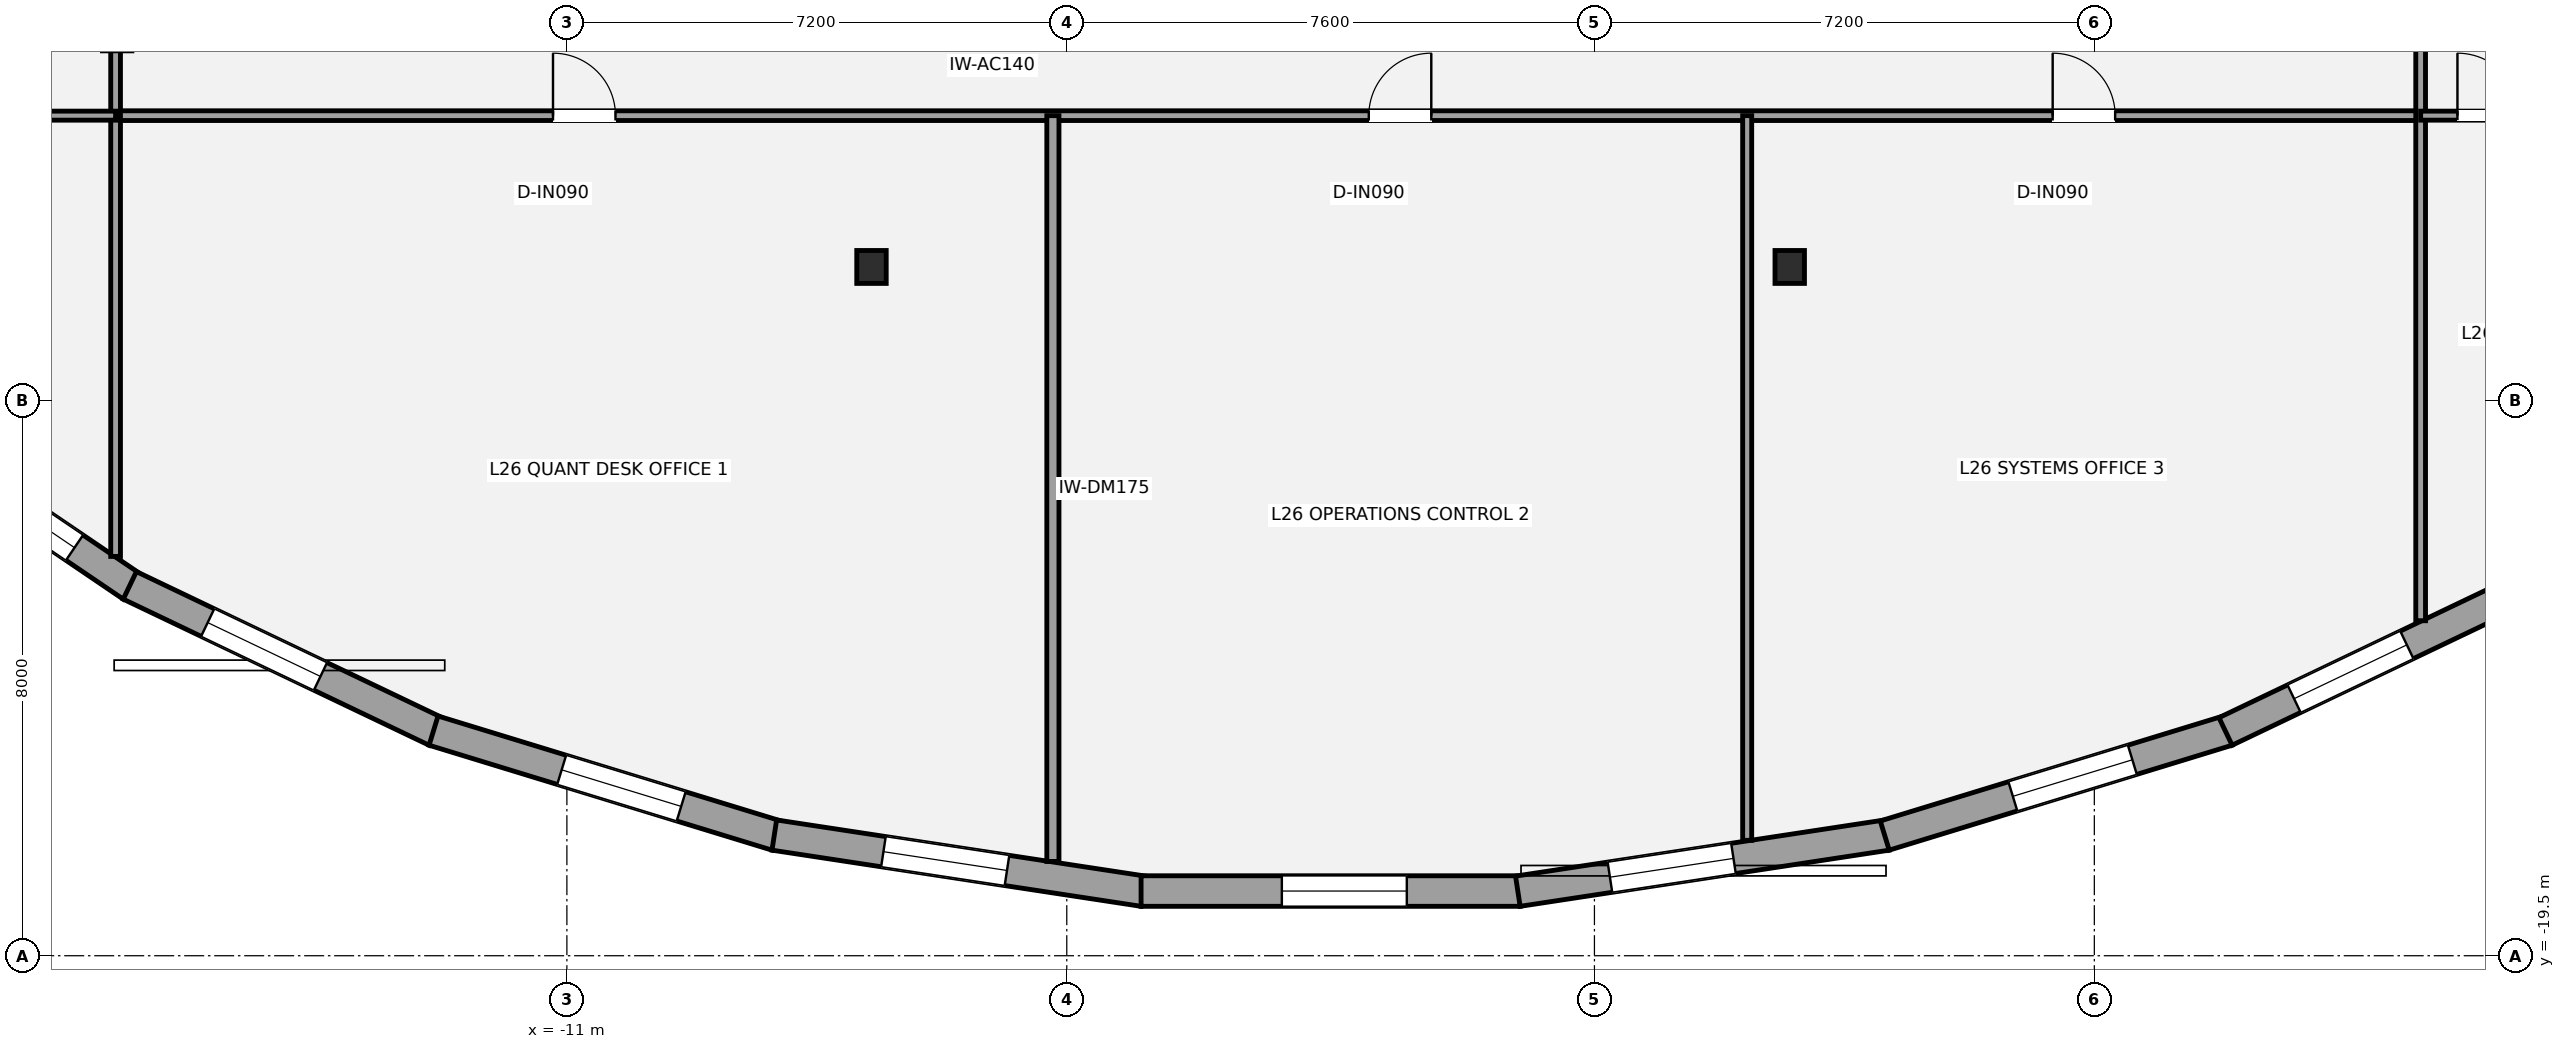
"""IFC4 building model, lengths in metres.
Left out: names, types, materials, properties, quantities, classifications, styles, units other than length and angle.
Written with IfcOpenShell. Run it as: python <this file> out.ifc"""

import sys

from ifc_helpers import new_model, si_unit, direction, frame, frame_2d, origin, origin_2d, place, context, subcontext, project, spatial, rectangle, i_section, extrude, element, fill, save


model = new_model("IFC4")
c1 = context("Model", 3, precision=1e-05, world=origin(), true_north=direction((0.0, 1.0)))
c2 = subcontext(c1, "Body", "Model", "MODEL_VIEW")
j1 = project(units=[si_unit("LENGTHUNIT", "METRE"), si_unit("PLANEANGLEUNIT", "RADIAN")], contexts=[c1])
p1 = place(None, origin())
s1 = spatial("IfcSite", under=j1, at=p1, CompositionType="ELEMENT")
p2 = place(p1, origin())
s2 = spatial("IfcBuilding", under=s1, at=p2, CompositionType="ELEMENT")
p3 = place(p2, frame((0.0, 0.0, 100.1)))
s3 = spatial("IfcBuildingStorey", under=s2, at=p3, CompositionType="ELEMENT", Elevation=100.1)
for number, where, z_axis, x_axis in (
    (1, (-6.613, -9.579, 0.0), (0.0, 0.0, 1.0), (1.0, 0.0, 0.0)),
    (2, (6.613, -9.579, 0.0), (0.0, 0.0, 1.0), (1.0, 0.0, 0.0)),
):
    element("IfcColumn", number, at=place(p3, frame(where, z_axis=z_axis, x_axis=x_axis)), inside=s3, PredefinedType="COLUMN", context=c2, shape_type="SweptSolid", body=[
        extrude(i_section(OverallWidth=0.424, OverallDepth=0.474, WebThickness=0.048, FlangeThickness=0.077, at=origin_2d()), origin(), (0.0, 0.0, 1.0), 3.5),
    ])
p4 = place(p3, frame((-17.266, -14.182, 0.0), z_axis=(0.0, 0.0, 1.0), x_axis=(-0.827754551165, 0.56109036975, 0.0)))
e3 = element("IfcWall", 3, at=p4, inside=s3, PredefinedType="STANDARD", context=c2, shape_type="SweptSolid", body=[
    extrude(rectangle(XDim=4.591, YDim=0.44, at=frame_2d((2.295, 0.0))), origin(), (0.0, 0.0, 1.0), 2.528),
])
p5 = place(p4, frame((0.997, 0.0, 0.65)))
e4 = element("IfcOpeningElement", 4, at=p5, cuts=e3, PredefinedType="OPENING", context=c2, shape_type="SweptSolid", body=[
    extrude(rectangle(XDim=1.8, YDim=1.7, at=frame_2d((0.9, 0.85))), frame((0.0, 0.23, 0.0), z_axis=(0.0, -1.0, 0.0), x_axis=(1.0, 0.0, 0.0)), (0.0, 0.0, 1.0), 0.46),
])
p6 = place(p3, frame((-12.89, -16.27, 0.0), z_axis=(0.0, 0.0, 1.0), x_axis=(-0.902372757907, 0.430956385018, 0.0)))
e5 = element("IfcWall", 5, at=p6, inside=s3, PredefinedType="STANDARD", context=c2, shape_type="SweptSolid", body=[
    extrude(rectangle(XDim=4.882, YDim=0.44, at=frame_2d((2.441, 0.0))), origin(), (0.0, 0.0, 1.0), 2.528),
])
p7 = place(p6, frame((1.839, 0.0, 0.65)))
e6 = element("IfcOpeningElement", 6, at=p7, cuts=e5, PredefinedType="OPENING", context=c2, shape_type="SweptSolid", body=[
    extrude(rectangle(XDim=1.8, YDim=1.7, at=frame_2d((0.9, 0.85))), frame((0.0, 0.23, 0.0), z_axis=(0.0, -1.0, 0.0), x_axis=(1.0, 0.0, 0.0)), (0.0, 0.0, 1.0), 0.46),
])
p8 = place(p3, frame((-7.981, -17.769, 0.0), z_axis=(0.0, 0.0, 1.0), x_axis=(-0.956228569431, 0.292620783617, 0.0)))
e7 = element("IfcWall", 7, at=p8, inside=s3, PredefinedType="STANDARD", context=c2, shape_type="SweptSolid", body=[
    extrude(rectangle(XDim=5.165, YDim=0.44, at=frame_2d((2.583, 0.0))), origin(), (0.0, 0.0, 1.0), 2.528),
])
p9 = place(p8, frame((1.436, 0.0, 0.65)))
e8 = element("IfcOpeningElement", 8, at=p9, cuts=e7, PredefinedType="OPENING", context=c2, shape_type="SweptSolid", body=[
    extrude(rectangle(XDim=1.8, YDim=1.7, at=frame_2d((0.9, 0.85))), frame((0.0, 0.23, 0.0), z_axis=(0.0, -1.0, 0.0), x_axis=(1.0, 0.0, 0.0)), (0.0, 0.0, 1.0), 0.46),
])
p10 = place(p3, frame((-2.697, -18.571, 0.0), z_axis=(0.0, 0.0, 1.0), x_axis=(-0.988627497469, 0.150385076545, 0.0)))
e9 = element("IfcWall", 9, at=p10, inside=s3, PredefinedType="STANDARD", context=c2, shape_type="SweptSolid", body=[
    extrude(rectangle(XDim=5.377, YDim=0.44, at=frame_2d((2.688, 0.0))), origin(), (0.0, 0.0, 1.0), 2.528),
])
p11 = place(p10, frame((1.987, 0.0, 0.65)))
e10 = element("IfcOpeningElement", 10, at=p11, cuts=e9, PredefinedType="OPENING", context=c2, shape_type="SweptSolid", body=[
    extrude(rectangle(XDim=1.8, YDim=1.7, at=frame_2d((0.9, 0.85))), frame((0.0, 0.23, 0.0), z_axis=(0.0, -1.0, 0.0), x_axis=(1.0, 0.0, 0.0)), (0.0, 0.0, 1.0), 0.46),
])
p12 = place(p3, frame((2.73, -18.568, 0.0), z_axis=(0.0, 0.0, 1.0), x_axis=(-1.0, 0.0, 0.0)))
e11 = element("IfcWall", 11, at=p12, inside=s3, PredefinedType="STANDARD", context=c2, shape_type="SweptSolid", body=[
    extrude(rectangle(XDim=5.459, YDim=0.44, at=frame_2d((2.73, 0.0))), origin(), (0.0, 0.0, 1.0), 2.528),
])
p13 = place(p12, frame((1.632, 0.0, 0.65)))
e12 = element("IfcOpeningElement", 12, at=p13, cuts=e11, PredefinedType="OPENING", context=c2, shape_type="SweptSolid", body=[
    extrude(rectangle(XDim=1.8, YDim=1.7, at=frame_2d((0.9, 0.85))), frame((0.0, 0.23, 0.0), z_axis=(0.0, -1.0, 0.0), x_axis=(1.0, 0.0, 0.0)), (0.0, 0.0, 1.0), 0.46),
])
p14 = place(p3, frame((8.012, -17.762, 0.0), z_axis=(0.0, 0.0, 1.0), x_axis=(-0.988627497469, -0.150385076545, 0.0)))
e13 = element("IfcWall", 13, at=p14, inside=s3, PredefinedType="STANDARD", context=c2, shape_type="SweptSolid", body=[
    extrude(rectangle(XDim=5.377, YDim=0.44, at=frame_2d((2.688, 0.0))), origin(), (0.0, 0.0, 1.0), 2.528),
])
p15 = place(p14, frame((2.235, 0.0, 0.65)))
e14 = element("IfcOpeningElement", 14, at=p15, cuts=e13, PredefinedType="OPENING", context=c2, shape_type="SweptSolid", body=[
    extrude(rectangle(XDim=1.8, YDim=1.7, at=frame_2d((0.9, 0.85))), frame((0.0, 0.23, 0.0), z_axis=(0.0, -1.0, 0.0), x_axis=(1.0, 0.0, 0.0)), (0.0, 0.0, 1.0), 0.46),
])
p16 = place(p3, frame((12.92, -16.258, 0.0), z_axis=(0.0, 0.0, 1.0), x_axis=(-0.956228569431, -0.292620783617, 0.0)))
e15 = element("IfcWall", 15, at=p16, inside=s3, PredefinedType="STANDARD", context=c2, shape_type="SweptSolid", body=[
    extrude(rectangle(XDim=5.165, YDim=0.44, at=frame_2d((2.583, 0.0))), origin(), (0.0, 0.0, 1.0), 2.528),
])
p17 = place(p16, frame((1.436, 0.0, 0.65)))
e16 = element("IfcOpeningElement", 16, at=p17, cuts=e15, PredefinedType="OPENING", context=c2, shape_type="SweptSolid", body=[
    extrude(rectangle(XDim=1.8, YDim=1.7, at=frame_2d((0.9, 0.85))), frame((0.0, 0.23, 0.0), z_axis=(0.0, -1.0, 0.0), x_axis=(1.0, 0.0, 0.0)), (0.0, 0.0, 1.0), 0.46),
])
p18 = place(p3, frame((17.295, -14.166, 0.0), z_axis=(0.0, 0.0, 1.0), x_axis=(-0.902372757907, -0.430956385018, 0.0)))
e17 = element("IfcWall", 17, at=p18, inside=s3, PredefinedType="STANDARD", context=c2, shape_type="SweptSolid", body=[
    extrude(rectangle(XDim=4.882, YDim=0.44, at=frame_2d((2.441, 0.0))), origin(), (0.0, 0.0, 1.0), 2.528),
])
p19 = place(p18, frame((1.988, 0.0, 0.65)))
e18 = element("IfcOpeningElement", 18, at=p19, cuts=e17, PredefinedType="OPENING", context=c2, shape_type="SweptSolid", body=[
    extrude(rectangle(XDim=1.8, YDim=1.7, at=frame_2d((0.9, 0.85))), frame((0.0, 0.23, 0.0), z_axis=(0.0, -1.0, 0.0), x_axis=(1.0, 0.0, 0.0)), (0.0, 0.0, 1.0), 0.46),
])
p20 = place(p3, frame((-17.5, -7.4, 0.0), z_axis=(0.0, 0.0, 1.0), x_axis=(1.0, 0.0, 0.0)))
e19 = element("IfcWall", 19, at=p20, inside=s3, PredefinedType="PARTITIONING", context=c2, shape_type="SweptSolid", body=[
    extrude(rectangle(XDim=33.2, YDim=0.14, at=frame_2d((16.6, 0.0))), origin(), (0.0, 0.0, 1.0), 2.688),
])
p21 = place(p20, frame((6.3, 0.0, 0.0)))
e20 = element("IfcOpeningElement", 20, at=p21, cuts=e19, PredefinedType="OPENING", context=c2, shape_type="SweptSolid", body=[
    extrude(rectangle(XDim=0.9, YDim=2.1, at=frame_2d((0.45, 1.05))), frame((0.0, 0.08, 0.0), z_axis=(0.0, -1.0, 0.0), x_axis=(1.0, 0.0, 0.0)), (0.0, 0.0, 1.0), 0.16),
])
p22 = place(p20, frame((18.05, 0.0, 0.0)))
e21 = element("IfcOpeningElement", 21, at=p22, cuts=e19, PredefinedType="OPENING", context=c2, shape_type="SweptSolid", body=[
    extrude(rectangle(XDim=0.9, YDim=2.1, at=frame_2d((0.45, 1.05))), frame((0.0, 0.08, 0.0), z_axis=(0.0, -1.0, 0.0), x_axis=(1.0, 0.0, 0.0)), (0.0, 0.0, 1.0), 0.16),
])
p23 = place(p20, frame((27.9, 0.0, 0.0)))
e22 = element("IfcOpeningElement", 22, at=p23, cuts=e19, PredefinedType="OPENING", context=c2, shape_type="SweptSolid", body=[
    extrude(rectangle(XDim=0.9, YDim=2.1, at=frame_2d((0.45, 1.05))), frame((0.0, 0.08, 0.0), z_axis=(0.0, -1.0, 0.0), x_axis=(1.0, 0.0, 0.0)), (0.0, 0.0, 1.0), 0.16),
])
p24 = place(p3, frame((-17.5, -13.748, 0.0), z_axis=(0.0, 0.0, 1.0), x_axis=(0.0, 1.0, 0.0)))
e23 = element("IfcWall", 23, at=p24, inside=s3, PredefinedType="PARTITIONING", context=c2, shape_type="SweptSolid", body=[
    extrude(rectangle(XDim=21.298, YDim=0.14, at=frame_2d((10.649, 0.0))), origin(), (0.0, 0.0, 1.0), 2.688),
])
p25 = place(p24, frame((10.499, 0.0, 0.0)))
e24 = element("IfcOpeningElement", 24, at=p25, cuts=e23, PredefinedType="OPENING", context=c2, shape_type="SweptSolid", body=[
    extrude(rectangle(XDim=0.9, YDim=2.1, at=frame_2d((0.45, 1.05))), frame((0.0, 0.08, 0.0), z_axis=(0.0, -1.0, 0.0), x_axis=(1.0, 0.0, 0.0)), (0.0, 0.0, 1.0), 0.16),
])
p26 = place(p24, frame((17.974, 0.0, 0.0)))
e25 = element("IfcOpeningElement", 25, at=p26, cuts=e23, PredefinedType="OPENING", context=c2, shape_type="SweptSolid", body=[
    extrude(rectangle(XDim=0.9, YDim=2.1, at=frame_2d((0.45, 1.05))), frame((0.0, 0.08, 0.0), z_axis=(0.0, -1.0, 0.0), x_axis=(1.0, 0.0, 0.0)), (0.0, 0.0, 1.0), 0.16),
])
p27 = place(p3, frame((15.7, -14.675, 0.0), z_axis=(0.0, 0.0, 1.0), x_axis=(0.0, 1.0, 0.0)))
e26 = element("IfcWall", 26, at=p27, inside=s3, PredefinedType="PARTITIONING", context=c2, shape_type="SweptSolid", body=[
    extrude(rectangle(XDim=22.225, YDim=0.14, at=frame_2d((11.112, 0.0))), origin(), (0.0, 0.0, 1.0), 2.763),
])
p28 = place(p27, frame((9.325, 0.0, 0.0)))
e27 = element("IfcOpeningElement", 27, at=p28, cuts=e26, PredefinedType="OPENING", context=c2, shape_type="SweptSolid", body=[
    extrude(rectangle(XDim=0.9, YDim=2.1, at=frame_2d((0.45, 1.05))), frame((0.0, 0.08, 0.0), z_axis=(0.0, -1.0, 0.0), x_axis=(1.0, 0.0, 0.0)), (0.0, 0.0, 1.0), 0.16),
])
p29 = place(p27, frame((13.525, 0.0, 0.0)))
e28 = element("IfcOpeningElement", 28, at=p29, cuts=e26, PredefinedType="OPENING", context=c2, shape_type="SweptSolid", body=[
    extrude(rectangle(XDim=0.9, YDim=2.1, at=frame_2d((0.45, 1.05))), frame((0.0, 0.08, 0.0), z_axis=(0.0, -1.0, 0.0), x_axis=(1.0, 0.0, 0.0)), (0.0, 0.0, 1.0), 0.16),
])
p30 = place(p27, frame((16.925, 0.0, 0.0)))
e29 = element("IfcOpeningElement", 29, at=p30, cuts=e26, PredefinedType="OPENING", context=c2, shape_type="SweptSolid", body=[
    extrude(rectangle(XDim=0.9, YDim=2.1, at=frame_2d((0.45, 1.05))), frame((0.0, 0.08, 0.0), z_axis=(0.0, -1.0, 0.0), x_axis=(1.0, 0.0, 0.0)), (0.0, 0.0, 1.0), 0.16),
])
p31 = place(p27, frame((20.2, 0.0, 0.0)))
e30 = element("IfcOpeningElement", 30, at=p31, cuts=e26, PredefinedType="OPENING", context=c2, shape_type="SweptSolid", body=[
    extrude(rectangle(XDim=0.9, YDim=2.1, at=frame_2d((0.45, 1.05))), frame((0.0, 0.08, 0.0), z_axis=(0.0, -1.0, 0.0), x_axis=(1.0, 0.0, 0.0)), (0.0, 0.0, 1.0), 0.16),
])
p32 = place(p3, frame((-4.0, -18.142, 0.0), z_axis=(0.0, 0.0, 1.0), x_axis=(0.0, 1.0, 0.0)))
e31 = element("IfcWall", 31, at=p32, inside=s3, PredefinedType="PARTITIONING", context=c2, shape_type="SweptSolid", body=[
    extrude(rectangle(XDim=10.742, YDim=0.175, at=frame_2d((5.371, 0.0))), origin(), (0.0, 0.0, 1.0), 2.763),
])
p33 = place(p3, frame((6.0, -17.838, 0.0), z_axis=(0.0, 0.0, 1.0), x_axis=(0.0, 1.0, 0.0)))
e32 = element("IfcWall", 32, at=p33, inside=s3, PredefinedType="PARTITIONING", context=c2, shape_type="SweptSolid", body=[
    extrude(rectangle(XDim=10.438, YDim=0.13, at=frame_2d((5.219, 0.0))), origin(), (0.0, 0.0, 1.0), 2.763),
])
p34 = place(p3, frame((-24.689, -7.4, 0.0), z_axis=(0.0, 0.0, 1.0), x_axis=(1.0, 0.0, 0.0)))
e33 = element("IfcWall", 33, at=p34, inside=s3, PredefinedType="PARTITIONING", context=c2, shape_type="SweptSolid", body=[
    extrude(rectangle(XDim=7.189, YDim=0.13, at=frame_2d((3.594, 0.0))), origin(), (0.0, 0.0, 1.0), 2.763),
])
p35 = place(p34, frame((0.63, 0.0, 0.0)))
e34 = element("IfcOpeningElement", 34, at=p35, cuts=e33, PredefinedType="OPENING", context=c2, shape_type="SweptSolid", body=[
    extrude(rectangle(XDim=0.9, YDim=2.1, at=frame_2d((0.45, 1.05))), frame((0.0, 0.075, 0.0), z_axis=(0.0, -1.0, 0.0), x_axis=(1.0, 0.0, 0.0)), (0.0, 0.0, 1.0), 0.15),
])
p36 = place(p3, frame((15.7, -7.4, 0.0), z_axis=(0.0, 0.0, 1.0), x_axis=(1.0, 0.0, 0.0)))
e35 = element("IfcWall", 35, at=p36, inside=s3, PredefinedType="PARTITIONING", context=c2, shape_type="SweptSolid", body=[
    extrude(rectangle(XDim=8.989, YDim=0.13, at=frame_2d((4.494, 0.0))), origin(), (0.0, 0.0, 1.0), 2.763),
])
p37 = place(p36, frame((0.53, 0.0, 0.0)))
e36 = element("IfcOpeningElement", 36, at=p37, cuts=e35, PredefinedType="OPENING", context=c2, shape_type="SweptSolid", body=[
    extrude(rectangle(XDim=0.9, YDim=2.1, at=frame_2d((0.45, 1.05))), frame((0.0, 0.075, 0.0), z_axis=(0.0, -1.0, 0.0), x_axis=(1.0, 0.0, 0.0)), (0.0, 0.0, 1.0), 0.15),
])
p38 = place(p5, origin())
e37 = element("IfcWindow", 37, at=p38, inside=s3, PartitioningType="SINGLE_PANEL", PredefinedType="WINDOW", context=c2, shape_type="SweptSolid", body=[
    extrude(rectangle(XDim=1.8, YDim=1.7, at=frame_2d((0.9, 0.85))), frame((0.0, -0.01, 0.0), z_axis=(0.0, -1.0, 0.0), x_axis=(1.0, 0.0, 0.0)), (0.0, 0.0, 1.0), 0.06),
])
fill(e4, e37)
p39 = place(p7, origin())
e38 = element("IfcWindow", 38, at=p39, inside=s3, PartitioningType="SINGLE_PANEL", PredefinedType="WINDOW", context=c2, shape_type="SweptSolid", body=[
    extrude(rectangle(XDim=1.8, YDim=1.7, at=frame_2d((0.9, 0.85))), frame((0.0, -0.01, 0.0), z_axis=(0.0, -1.0, 0.0), x_axis=(1.0, 0.0, 0.0)), (0.0, 0.0, 1.0), 0.06),
])
fill(e6, e38)
p40 = place(p9, origin())
e39 = element("IfcWindow", 39, at=p40, inside=s3, PartitioningType="SINGLE_PANEL", PredefinedType="WINDOW", context=c2, shape_type="SweptSolid", body=[
    extrude(rectangle(XDim=1.8, YDim=1.7, at=frame_2d((0.9, 0.85))), frame((0.0, -0.01, 0.0), z_axis=(0.0, -1.0, 0.0), x_axis=(1.0, 0.0, 0.0)), (0.0, 0.0, 1.0), 0.06),
])
fill(e8, e39)
p41 = place(p11, origin())
e40 = element("IfcWindow", 40, at=p41, inside=s3, PartitioningType="SINGLE_PANEL", PredefinedType="WINDOW", context=c2, shape_type="SweptSolid", body=[
    extrude(rectangle(XDim=1.8, YDim=1.7, at=frame_2d((0.9, 0.85))), frame((0.0, -0.01, 0.0), z_axis=(0.0, -1.0, 0.0), x_axis=(1.0, 0.0, 0.0)), (0.0, 0.0, 1.0), 0.06),
])
fill(e10, e40)
p42 = place(p13, origin())
e41 = element("IfcWindow", 41, at=p42, inside=s3, PartitioningType="SINGLE_PANEL", PredefinedType="WINDOW", context=c2, shape_type="SweptSolid", body=[
    extrude(rectangle(XDim=1.8, YDim=1.7, at=frame_2d((0.9, 0.85))), frame((0.0, -0.01, 0.0), z_axis=(0.0, -1.0, 0.0), x_axis=(1.0, 0.0, 0.0)), (0.0, 0.0, 1.0), 0.06),
])
fill(e12, e41)
p43 = place(p15, origin())
e42 = element("IfcWindow", 42, at=p43, inside=s3, PartitioningType="SINGLE_PANEL", PredefinedType="WINDOW", context=c2, shape_type="SweptSolid", body=[
    extrude(rectangle(XDim=1.8, YDim=1.7, at=frame_2d((0.9, 0.85))), frame((0.0, -0.01, 0.0), z_axis=(0.0, -1.0, 0.0), x_axis=(1.0, 0.0, 0.0)), (0.0, 0.0, 1.0), 0.06),
])
fill(e14, e42)
p44 = place(p17, origin())
e43 = element("IfcWindow", 43, at=p44, inside=s3, PartitioningType="SINGLE_PANEL", PredefinedType="WINDOW", context=c2, shape_type="SweptSolid", body=[
    extrude(rectangle(XDim=1.8, YDim=1.7, at=frame_2d((0.9, 0.85))), frame((0.0, -0.01, 0.0), z_axis=(0.0, -1.0, 0.0), x_axis=(1.0, 0.0, 0.0)), (0.0, 0.0, 1.0), 0.06),
])
fill(e16, e43)
p45 = place(p19, origin())
e44 = element("IfcWindow", 44, at=p45, inside=s3, PartitioningType="SINGLE_PANEL", PredefinedType="WINDOW", context=c2, shape_type="SweptSolid", body=[
    extrude(rectangle(XDim=1.8, YDim=1.7, at=frame_2d((0.9, 0.85))), frame((0.0, -0.01, 0.0), z_axis=(0.0, -1.0, 0.0), x_axis=(1.0, 0.0, 0.0)), (0.0, 0.0, 1.0), 0.06),
])
fill(e18, e44)
p46 = place(p21, origin())
e45 = element("IfcDoor", 45, at=p46, inside=s3, OperationType="SINGLE_SWING_LEFT", PredefinedType="DOOR", context=c2, shape_type="SweptSolid", body=[
    extrude(rectangle(XDim=0.9, YDim=2.1, at=frame_2d((0.45, 1.05))), frame((0.0, 0.025, 0.0), z_axis=(0.0, -1.0, 0.0), x_axis=(1.0, 0.0, 0.0)), (0.0, 0.0, 1.0), 0.05),
])
fill(e20, e45)
p47 = place(p22, origin())
e46 = element("IfcDoor", 46, at=p47, inside=s3, OperationType="SINGLE_SWING_RIGHT", PredefinedType="DOOR", context=c2, shape_type="SweptSolid", body=[
    extrude(rectangle(XDim=0.9, YDim=2.1, at=frame_2d((0.45, 1.05))), frame((0.0, 0.025, 0.0), z_axis=(0.0, -1.0, 0.0), x_axis=(1.0, 0.0, 0.0)), (0.0, 0.0, 1.0), 0.05),
])
fill(e21, e46)
p48 = place(p23, origin())
e47 = element("IfcDoor", 47, at=p48, inside=s3, OperationType="SINGLE_SWING_LEFT", PredefinedType="DOOR", context=c2, shape_type="SweptSolid", body=[
    extrude(rectangle(XDim=0.9, YDim=2.1, at=frame_2d((0.45, 1.05))), frame((0.0, 0.025, 0.0), z_axis=(0.0, -1.0, 0.0), x_axis=(1.0, 0.0, 0.0)), (0.0, 0.0, 1.0), 0.05),
])
fill(e22, e47)
p49 = place(p37, origin())
e48 = element("IfcDoor", 48, at=p49, inside=s3, OperationType="SINGLE_SWING_LEFT", PredefinedType="DOOR", context=c2, shape_type="SweptSolid", body=[
    extrude(rectangle(XDim=0.9, YDim=2.1, at=frame_2d((0.45, 1.05))), frame((0.0, 0.025, 0.0), z_axis=(0.0, -1.0, 0.0), x_axis=(1.0, 0.0, 0.0)), (0.0, 0.0, 1.0), 0.05),
])
fill(e36, e48)
save(model, sys.argv[1])
